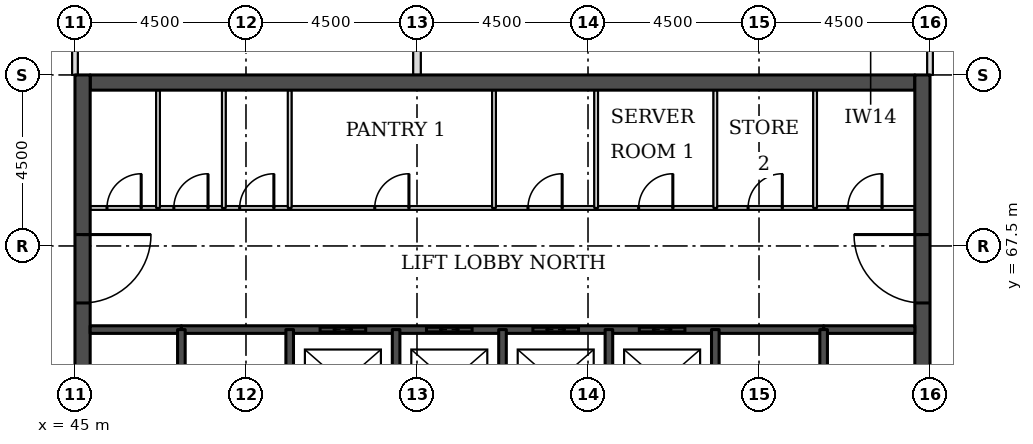
"""IFC4 building model, lengths in metres.
Left out: names, types, materials, properties, quantities, classifications, styles, units other than length and angle.
Written with IfcOpenShell. Run it as: python <this file> out.ifc"""

import sys

from ifc_helpers import new_model, si_unit, direction, frame, frame_2d, origin, place, context, subcontext, project, spatial, rectangle, extrude, element, fill, save


model = new_model("IFC4")
c1 = context("Model", 3, precision=1e-05, world=origin(), true_north=direction((0.0, 1.0)))
c2 = subcontext(c1, "Body", "Model", "MODEL_VIEW")
j1 = project(units=[si_unit("LENGTHUNIT", "METRE"), si_unit("PLANEANGLEUNIT", "RADIAN")], contexts=[c1])
p1 = place(None, origin())
s1 = spatial("IfcSite", under=j1, at=p1, CompositionType="ELEMENT")
p2 = place(p1, origin())
s2 = spatial("IfcBuilding", under=s1, at=p2, CompositionType="ELEMENT")
p3 = place(p2, frame((0.0, 0.0, 248.9)))
s3 = spatial("IfcBuildingStorey", under=s2, at=p3, CompositionType="ELEMENT", Elevation=248.9)
p4 = place(p3, frame((45.4, 71.8, 0.0), z_axis=(0.0, 0.0, 1.0), x_axis=(1.0, 0.0, 0.0)))
e1 = element("IfcWall", 1, at=p4, inside=s3, PredefinedType="SHEAR", context=c2, shape_type="SweptSolid", body=[
    extrude(rectangle(XDim=21.7, YDim=0.4, at=frame_2d((10.85, 0.0))), origin(), (0.0, 0.0, 1.0), 3.7),
])
p5 = place(p3, frame((45.2, 49.5, 0.0), z_axis=(0.0, 0.0, 1.0), x_axis=(0.0, 1.0, 0.0)))
e2 = element("IfcWall", 2, at=p5, inside=s3, PredefinedType="SHEAR", context=c2, shape_type="SweptSolid", body=[
    extrude(rectangle(XDim=22.5, YDim=0.4, at=frame_2d((11.25, 0.0))), origin(), (0.0, 0.0, 1.0), 3.7),
])
p6 = place(p5, frame((4.2, 0.0, 0.0)))
e3 = element("IfcOpeningElement", 3, at=p6, cuts=e2, PredefinedType="OPENING", context=c2, shape_type="SweptSolid", body=[
    extrude(rectangle(XDim=1.8, YDim=2.1, at=frame_2d((0.9, 1.05))), frame((0.0, 0.21, 0.0), z_axis=(0.0, -1.0, 0.0), x_axis=(1.0, 0.0, 0.0)), (0.0, 0.0, 1.0), 0.42),
])
p7 = place(p5, frame((6.9, 0.0, 0.0)))
e4 = element("IfcOpeningElement", 4, at=p7, cuts=e2, PredefinedType="OPENING", context=c2, shape_type="SweptSolid", body=[
    extrude(rectangle(XDim=1.1, YDim=2.1, at=frame_2d((0.55, 1.05))), frame((0.0, 0.21, 0.0), z_axis=(0.0, -1.0, 0.0), x_axis=(1.0, 0.0, 0.0)), (0.0, 0.0, 1.0), 0.42),
])
p8 = place(p5, frame((13.6, 0.0, 0.0)))
e5 = element("IfcOpeningElement", 5, at=p8, cuts=e2, PredefinedType="OPENING", context=c2, shape_type="SweptSolid", body=[
    extrude(rectangle(XDim=1.1, YDim=2.1, at=frame_2d((0.55, 1.05))), frame((0.0, 0.21, 0.0), z_axis=(0.0, -1.0, 0.0), x_axis=(1.0, 0.0, 0.0)), (0.0, 0.0, 1.0), 0.42),
])
p9 = place(p5, frame((16.5, 0.0, 0.0)))
e6 = element("IfcOpeningElement", 6, at=p9, cuts=e2, PredefinedType="OPENING", context=c2, shape_type="SweptSolid", body=[
    extrude(rectangle(XDim=1.8, YDim=2.1, at=frame_2d((0.9, 1.05))), frame((0.0, 0.21, 0.0), z_axis=(0.0, -1.0, 0.0), x_axis=(1.0, 0.0, 0.0)), (0.0, 0.0, 1.0), 0.42),
])
p10 = place(p3, frame((67.3, 49.5, 0.0), z_axis=(0.0, 0.0, 1.0), x_axis=(0.0, 1.0, 0.0)))
e7 = element("IfcWall", 7, at=p10, inside=s3, PredefinedType="SHEAR", context=c2, shape_type="SweptSolid", body=[
    extrude(rectangle(XDim=22.5, YDim=0.4, at=frame_2d((11.25, 0.0))), origin(), (0.0, 0.0, 1.0), 3.7),
])
p11 = place(p10, frame((4.2, 0.0, 0.0)))
e8 = element("IfcOpeningElement", 8, at=p11, cuts=e7, PredefinedType="OPENING", context=c2, shape_type="SweptSolid", body=[
    extrude(rectangle(XDim=1.8, YDim=2.1, at=frame_2d((0.9, 1.05))), frame((0.0, 0.21, 0.0), z_axis=(0.0, -1.0, 0.0), x_axis=(1.0, 0.0, 0.0)), (0.0, 0.0, 1.0), 0.42),
])
p12 = place(p10, frame((6.9, 0.0, 0.0)))
e9 = element("IfcOpeningElement", 9, at=p12, cuts=e7, PredefinedType="OPENING", context=c2, shape_type="SweptSolid", body=[
    extrude(rectangle(XDim=1.1, YDim=2.1, at=frame_2d((0.55, 1.05))), frame((0.0, 0.21, 0.0), z_axis=(0.0, -1.0, 0.0), x_axis=(1.0, 0.0, 0.0)), (0.0, 0.0, 1.0), 0.42),
])
p13 = place(p10, frame((13.6, 0.0, 0.0)))
e10 = element("IfcOpeningElement", 10, at=p13, cuts=e7, PredefinedType="OPENING", context=c2, shape_type="SweptSolid", body=[
    extrude(rectangle(XDim=1.1, YDim=2.1, at=frame_2d((0.55, 1.05))), frame((0.0, 0.21, 0.0), z_axis=(0.0, -1.0, 0.0), x_axis=(1.0, 0.0, 0.0)), (0.0, 0.0, 1.0), 0.42),
])
p14 = place(p10, frame((16.5, 0.0, 0.0)))
e11 = element("IfcOpeningElement", 11, at=p14, cuts=e7, PredefinedType="OPENING", context=c2, shape_type="SweptSolid", body=[
    extrude(rectangle(XDim=1.8, YDim=2.1, at=frame_2d((0.9, 1.05))), frame((0.0, 0.21, 0.0), z_axis=(0.0, -1.0, 0.0), x_axis=(1.0, 0.0, 0.0)), (0.0, 0.0, 1.0), 0.42),
])
p15 = place(p3, frame((45.0, 72.0, 0.0), z_axis=(0.0, 0.0, 1.0), x_axis=(0.0, 1.0, 0.0)))
e12 = element("IfcWall", 12, at=p15, inside=s3, PredefinedType="PARTITIONING", context=c2, shape_type="SweptSolid", body=[
    extrude(rectangle(XDim=3.0, YDim=0.15, at=frame_2d((1.5, 0.0))), origin(), (0.0, 0.0, 1.0), 3.022),
])
p16 = place(p3, frame((54.0, 72.0, 0.0), z_axis=(0.0, 0.0, 1.0), x_axis=(0.0, 1.0, 0.0)))
e13 = element("IfcWall", 13, at=p16, inside=s3, PredefinedType="PARTITIONING", context=c2, shape_type="SweptSolid", body=[
    extrude(rectangle(XDim=3.0, YDim=0.2, at=frame_2d((1.5, 0.0))), origin(), (0.0, 0.0, 1.0), 3.55),
])
p17 = place(p3, frame((67.5, 72.0, 0.0), z_axis=(0.0, 0.0, 1.0), x_axis=(0.0, 1.0, 0.0)))
e14 = element("IfcWall", 14, at=p17, inside=s3, PredefinedType="PARTITIONING", context=c2, shape_type="SweptSolid", body=[
    extrude(rectangle(XDim=3.0, YDim=0.15, at=frame_2d((1.5, 0.0))), origin(), (0.0, 0.0, 1.0), 3.022),
])
for number, where, z_axis, x_axis in (
    (15, (45.4, 65.3, 0.0), (0.0, 0.0, 1.0), (1.0, 0.0, 0.0)),
    (16, (64.7, 65.3, 0.0), (0.0, 0.0, 1.0), (1.0, 0.0, 0.0)),
):
    element("IfcWall", number, at=place(p3, frame(where, z_axis=z_axis, x_axis=x_axis)), inside=s3, PredefinedType="SOLIDWALL", context=c2, shape_type="SweptSolid", body=[
        extrude(rectangle(XDim=2.4, YDim=0.2, at=frame_2d((1.2, 0.0))), origin(), (0.0, 0.0, 1.0), 3.55),
    ])
p18 = place(p3, frame((47.8, 65.3, 0.0), z_axis=(0.0, 0.0, 1.0), x_axis=(1.0, 0.0, 0.0)))
e17 = element("IfcWall", 17, at=p18, inside=s3, PredefinedType="SOLIDWALL", context=c2, shape_type="SweptSolid", body=[
    extrude(rectangle(XDim=16.9, YDim=0.2, at=frame_2d((8.45, 0.0))), origin(), (0.0, 0.0, 1.0), 3.55),
])
p19 = place(p18, frame((3.65, 0.0, 0.0)))
e18 = element("IfcOpeningElement", 18, at=p19, cuts=e17, PredefinedType="OPENING", context=c2, shape_type="SweptSolid", body=[
    extrude(rectangle(XDim=1.2, YDim=2.1, at=frame_2d((0.6, 1.05))), frame((0.0, 0.11, 0.0), z_axis=(0.0, -1.0, 0.0), x_axis=(1.0, 0.0, 0.0)), (0.0, 0.0, 1.0), 0.22),
])
p20 = place(p18, frame((6.45, 0.0, 0.0)))
e19 = element("IfcOpeningElement", 19, at=p20, cuts=e17, PredefinedType="OPENING", context=c2, shape_type="SweptSolid", body=[
    extrude(rectangle(XDim=1.2, YDim=2.1, at=frame_2d((0.6, 1.05))), frame((0.0, 0.11, 0.0), z_axis=(0.0, -1.0, 0.0), x_axis=(1.0, 0.0, 0.0)), (0.0, 0.0, 1.0), 0.22),
])
p21 = place(p18, frame((9.25, 0.0, 0.0)))
e20 = element("IfcOpeningElement", 20, at=p21, cuts=e17, PredefinedType="OPENING", context=c2, shape_type="SweptSolid", body=[
    extrude(rectangle(XDim=1.2, YDim=2.1, at=frame_2d((0.6, 1.05))), frame((0.0, 0.11, 0.0), z_axis=(0.0, -1.0, 0.0), x_axis=(1.0, 0.0, 0.0)), (0.0, 0.0, 1.0), 0.22),
])
p22 = place(p18, frame((12.05, 0.0, 0.0)))
e21 = element("IfcOpeningElement", 21, at=p22, cuts=e17, PredefinedType="OPENING", context=c2, shape_type="SweptSolid", body=[
    extrude(rectangle(XDim=1.2, YDim=2.1, at=frame_2d((0.6, 1.05))), frame((0.0, 0.11, 0.0), z_axis=(0.0, -1.0, 0.0), x_axis=(1.0, 0.0, 0.0)), (0.0, 0.0, 1.0), 0.22),
])
p23 = place(p3, frame((45.4, 68.5, 0.0), z_axis=(0.0, 0.0, 1.0), x_axis=(1.0, 0.0, 0.0)))
e22 = element("IfcWall", 22, at=p23, inside=s3, PredefinedType="PARTITIONING", context=c2, shape_type="SweptSolid", body=[
    extrude(rectangle(XDim=21.7, YDim=0.1, at=frame_2d((10.85, 0.0))), origin(), (0.0, 0.0, 1.0), 3.55),
])
p24 = place(p23, frame((19.938, 0.0, 0.0)))
e23 = element("IfcOpeningElement", 23, at=p24, cuts=e22, PredefinedType="OPENING", context=c2, shape_type="SweptSolid", body=[
    extrude(rectangle(XDim=0.9, YDim=2.1, at=frame_2d((0.45, 1.05))), frame((0.0, 0.06, 0.0), z_axis=(0.0, -1.0, 0.0), x_axis=(1.0, 0.0, 0.0)), (0.0, 0.0, 1.0), 0.12),
])
p25 = place(p23, frame((17.312, 0.0, 0.0)))
e24 = element("IfcOpeningElement", 24, at=p25, cuts=e22, PredefinedType="OPENING", context=c2, shape_type="SweptSolid", body=[
    extrude(rectangle(XDim=0.9, YDim=2.1, at=frame_2d((0.45, 1.05))), frame((0.0, 0.06, 0.0), z_axis=(0.0, -1.0, 0.0), x_axis=(1.0, 0.0, 0.0)), (0.0, 0.0, 1.0), 0.12),
])
p26 = place(p23, frame((0.442, 0.0, 0.0)))
e25 = element("IfcOpeningElement", 25, at=p26, cuts=e22, PredefinedType="OPENING", context=c2, shape_type="SweptSolid", body=[
    extrude(rectangle(XDim=0.9, YDim=2.1, at=frame_2d((0.45, 1.05))), frame((0.0, 0.06, 0.0), z_axis=(0.0, -1.0, 0.0), x_axis=(1.0, 0.0, 0.0)), (0.0, 0.0, 1.0), 0.12),
])
p27 = place(p23, frame((2.201, 0.0, 0.0)))
e26 = element("IfcOpeningElement", 26, at=p27, cuts=e22, PredefinedType="OPENING", context=c2, shape_type="SweptSolid", body=[
    extrude(rectangle(XDim=0.9, YDim=2.1, at=frame_2d((0.45, 1.05))), frame((0.0, 0.06, 0.0), z_axis=(0.0, -1.0, 0.0), x_axis=(1.0, 0.0, 0.0)), (0.0, 0.0, 1.0), 0.12),
])
p28 = place(p23, frame((3.934, 0.0, 0.0)))
e27 = element("IfcOpeningElement", 27, at=p28, cuts=e22, PredefinedType="OPENING", context=c2, shape_type="SweptSolid", body=[
    extrude(rectangle(XDim=0.9, YDim=2.1, at=frame_2d((0.45, 1.05))), frame((0.0, 0.06, 0.0), z_axis=(0.0, -1.0, 0.0), x_axis=(1.0, 0.0, 0.0)), (0.0, 0.0, 1.0), 0.12),
])
p29 = place(p23, frame((14.432, 0.0, 0.0)))
e28 = element("IfcOpeningElement", 28, at=p29, cuts=e22, PredefinedType="OPENING", context=c2, shape_type="SweptSolid", body=[
    extrude(rectangle(XDim=0.9, YDim=2.1, at=frame_2d((0.45, 1.05))), frame((0.0, 0.06, 0.0), z_axis=(0.0, -1.0, 0.0), x_axis=(1.0, 0.0, 0.0)), (0.0, 0.0, 1.0), 0.12),
])
p30 = place(p23, frame((11.52, 0.0, 0.0)))
e29 = element("IfcOpeningElement", 29, at=p30, cuts=e22, PredefinedType="OPENING", context=c2, shape_type="SweptSolid", body=[
    extrude(rectangle(XDim=0.9, YDim=2.1, at=frame_2d((0.45, 1.05))), frame((0.0, 0.06, 0.0), z_axis=(0.0, -1.0, 0.0), x_axis=(1.0, 0.0, 0.0)), (0.0, 0.0, 1.0), 0.12),
])
p31 = place(p23, frame((7.488, 0.0, 0.0)))
e30 = element("IfcOpeningElement", 30, at=p31, cuts=e22, PredefinedType="OPENING", context=c2, shape_type="SweptSolid", body=[
    extrude(rectangle(XDim=0.9, YDim=2.1, at=frame_2d((0.45, 1.05))), frame((0.0, 0.06, 0.0), z_axis=(0.0, -1.0, 0.0), x_axis=(1.0, 0.0, 0.0)), (0.0, 0.0, 1.0), 0.12),
])
p32 = place(p3, frame((47.185, 68.5, 0.0), z_axis=(0.0, 0.0, 1.0), x_axis=(0.0, 1.0, 0.0)))
e31 = element("IfcWall", 31, at=p32, inside=s3, PredefinedType="PARTITIONING", context=c2, shape_type="SweptSolid", body=[
    extrude(rectangle(XDim=3.1, YDim=0.1, at=frame_2d((1.55, 0.0))), origin(), (0.0, 0.0, 1.0), 3.55),
])
p33 = place(p3, frame((47.8, 62.0, 0.0), z_axis=(0.0, 0.0, 1.0), x_axis=(0.0, 1.0, 0.0)))
e32 = element("IfcWall", 32, at=p33, inside=s3, PredefinedType="SOLIDWALL", context=c2, shape_type="SweptSolid", body=[
    extrude(rectangle(XDim=3.3, YDim=0.2, at=frame_2d((1.65, 0.0))), origin(), (0.0, 0.0, 1.0), 3.55),
])
p34 = place(p33, frame((1.1, 0.0, 0.0)))
e33 = element("IfcOpeningElement", 33, at=p34, cuts=e32, PredefinedType="OPENING", context=c2, shape_type="SweptSolid", body=[
    extrude(rectangle(XDim=1.1, YDim=2.1, at=frame_2d((0.55, 1.05))), frame((0.0, 0.11, 0.0), z_axis=(0.0, -1.0, 0.0), x_axis=(1.0, 0.0, 0.0)), (0.0, 0.0, 1.0), 0.22),
])
for number, where, z_axis, x_axis in (
    (34, (48.917, 68.5, 0.0), (0.0, 0.0, 1.0), (0.0, 1.0, 0.0)),
    (35, (50.65, 68.5, 0.0), (0.0, 0.0, 1.0), (0.0, 1.0, 0.0)),
):
    element("IfcWall", number, at=place(p3, frame(where, z_axis=z_axis, x_axis=x_axis)), inside=s3, PredefinedType="PARTITIONING", context=c2, shape_type="SweptSolid", body=[
        extrude(rectangle(XDim=3.1, YDim=0.1, at=frame_2d((1.55, 0.0))), origin(), (0.0, 0.0, 1.0), 3.55),
    ])
p35 = place(p3, frame((50.65, 62.0, 0.0), z_axis=(0.0, 0.0, 1.0), x_axis=(0.0, 1.0, 0.0)))
e36 = element("IfcWall", 36, at=p35, inside=s3, PredefinedType="SOLIDWALL", context=c2, shape_type="SweptSolid", body=[
    extrude(rectangle(XDim=3.3, YDim=0.2, at=frame_2d((1.65, 0.0))), origin(), (0.0, 0.0, 1.0), 3.55),
])
p36 = place(p3, frame((53.45, 62.5, 0.0), z_axis=(0.0, 0.0, 1.0), x_axis=(0.0, 1.0, 0.0)))
e37 = element("IfcWall", 37, at=p36, inside=s3, PredefinedType="SOLIDWALL", context=c2, shape_type="SweptSolid", body=[
    extrude(rectangle(XDim=2.8, YDim=0.2, at=frame_2d((1.4, 0.0))), origin(), (0.0, 0.0, 1.0), 3.55),
])
p37 = place(p3, frame((56.026, 68.5, 0.0), z_axis=(0.0, 0.0, 1.0), x_axis=(0.0, 1.0, 0.0)))
e38 = element("IfcWall", 38, at=p37, inside=s3, PredefinedType="PARTITIONING", context=c2, shape_type="SweptSolid", body=[
    extrude(rectangle(XDim=3.1, YDim=0.1, at=frame_2d((1.55, 0.0))), origin(), (0.0, 0.0, 1.0), 3.55),
])
p38 = place(p3, frame((56.25, 62.5, 0.0), z_axis=(0.0, 0.0, 1.0), x_axis=(0.0, 1.0, 0.0)))
e39 = element("IfcWall", 39, at=p38, inside=s3, PredefinedType="SOLIDWALL", context=c2, shape_type="SweptSolid", body=[
    extrude(rectangle(XDim=2.8, YDim=0.2, at=frame_2d((1.4, 0.0))), origin(), (0.0, 0.0, 1.0), 3.55),
])
p39 = place(p3, frame((58.714, 68.5, 0.0), z_axis=(0.0, 0.0, 1.0), x_axis=(0.0, 1.0, 0.0)))
e40 = element("IfcWall", 40, at=p39, inside=s3, PredefinedType="PARTITIONING", context=c2, shape_type="SweptSolid", body=[
    extrude(rectangle(XDim=3.1, YDim=0.1, at=frame_2d((1.55, 0.0))), origin(), (0.0, 0.0, 1.0), 3.55),
])
p40 = place(p3, frame((59.05, 62.5, 0.0), z_axis=(0.0, 0.0, 1.0), x_axis=(0.0, 1.0, 0.0)))
e41 = element("IfcWall", 41, at=p40, inside=s3, PredefinedType="SOLIDWALL", context=c2, shape_type="SweptSolid", body=[
    extrude(rectangle(XDim=2.8, YDim=0.2, at=frame_2d((1.4, 0.0))), origin(), (0.0, 0.0, 1.0), 3.55),
])
p41 = place(p3, frame((61.85, 68.5, 0.0), z_axis=(0.0, 0.0, 1.0), x_axis=(0.0, 1.0, 0.0)))
e42 = element("IfcWall", 42, at=p41, inside=s3, PredefinedType="PARTITIONING", context=c2, shape_type="SweptSolid", body=[
    extrude(rectangle(XDim=3.1, YDim=0.1, at=frame_2d((1.55, 0.0))), origin(), (0.0, 0.0, 1.0), 3.55),
])
p42 = place(p3, frame((61.85, 62.0, 0.0), z_axis=(0.0, 0.0, 1.0), x_axis=(0.0, 1.0, 0.0)))
e43 = element("IfcWall", 43, at=p42, inside=s3, PredefinedType="SOLIDWALL", context=c2, shape_type="SweptSolid", body=[
    extrude(rectangle(XDim=3.3, YDim=0.2, at=frame_2d((1.65, 0.0))), origin(), (0.0, 0.0, 1.0), 3.55),
])
p43 = place(p3, frame((64.475, 68.5, 0.0), z_axis=(0.0, 0.0, 1.0), x_axis=(0.0, 1.0, 0.0)))
e44 = element("IfcWall", 44, at=p43, inside=s3, PredefinedType="PARTITIONING", context=c2, shape_type="SweptSolid", body=[
    extrude(rectangle(XDim=3.1, YDim=0.1, at=frame_2d((1.55, 0.0))), origin(), (0.0, 0.0, 1.0), 3.55),
])
p44 = place(p3, frame((64.7, 62.0, 0.0), z_axis=(0.0, 0.0, 1.0), x_axis=(0.0, 1.0, 0.0)))
e45 = element("IfcWall", 45, at=p44, inside=s3, PredefinedType="SOLIDWALL", context=c2, shape_type="SweptSolid", body=[
    extrude(rectangle(XDim=3.3, YDim=0.2, at=frame_2d((1.65, 0.0))), origin(), (0.0, 0.0, 1.0), 3.55),
])
p45 = place(p44, frame((1.1, 0.0, 0.0)))
e46 = element("IfcOpeningElement", 46, at=p45, cuts=e45, PredefinedType="OPENING", context=c2, shape_type="SweptSolid", body=[
    extrude(rectangle(XDim=1.1, YDim=2.1, at=frame_2d((0.55, 1.05))), frame((0.0, 0.11, 0.0), z_axis=(0.0, -1.0, 0.0), x_axis=(1.0, 0.0, 0.0)), (0.0, 0.0, 1.0), 0.22),
])
p46 = place(p19, origin())
e47 = element("IfcDoor", 47, at=p46, inside=s3, OperationType="DOUBLE_DOOR_SLIDING", PredefinedType="DOOR", context=c2, shape_type="SweptSolid", body=[
    extrude(rectangle(XDim=1.2, YDim=2.1, at=frame_2d((0.6, 1.05))), frame((0.0, 0.025, 0.0), z_axis=(0.0, -1.0, 0.0), x_axis=(1.0, 0.0, 0.0)), (0.0, 0.0, 1.0), 0.05),
])
fill(e18, e47)
p47 = place(p20, origin())
e48 = element("IfcDoor", 48, at=p47, inside=s3, OperationType="DOUBLE_DOOR_SLIDING", PredefinedType="DOOR", context=c2, shape_type="SweptSolid", body=[
    extrude(rectangle(XDim=1.2, YDim=2.1, at=frame_2d((0.6, 1.05))), frame((0.0, 0.025, 0.0), z_axis=(0.0, -1.0, 0.0), x_axis=(1.0, 0.0, 0.0)), (0.0, 0.0, 1.0), 0.05),
])
fill(e19, e48)
p48 = place(p21, origin())
e49 = element("IfcDoor", 49, at=p48, inside=s3, OperationType="DOUBLE_DOOR_SLIDING", PredefinedType="DOOR", context=c2, shape_type="SweptSolid", body=[
    extrude(rectangle(XDim=1.2, YDim=2.1, at=frame_2d((0.6, 1.05))), frame((0.0, 0.025, 0.0), z_axis=(0.0, -1.0, 0.0), x_axis=(1.0, 0.0, 0.0)), (0.0, 0.0, 1.0), 0.05),
])
fill(e20, e49)
p49 = place(p22, origin())
e50 = element("IfcDoor", 50, at=p49, inside=s3, OperationType="DOUBLE_DOOR_SLIDING", PredefinedType="DOOR", context=c2, shape_type="SweptSolid", body=[
    extrude(rectangle(XDim=1.2, YDim=2.1, at=frame_2d((0.6, 1.05))), frame((0.0, 0.025, 0.0), z_axis=(0.0, -1.0, 0.0), x_axis=(1.0, 0.0, 0.0)), (0.0, 0.0, 1.0), 0.05),
])
fill(e21, e50)
p50 = place(p9, frame((1.8, 0.0, 0.0), z_axis=(0.0, 0.0, 1.0), x_axis=(-1.0, 0.0, 0.0)))
e51 = element("IfcDoor", 51, at=p50, inside=s3, OperationType="SINGLE_SWING_LEFT", PredefinedType="DOOR", context=c2, shape_type="SweptSolid", body=[
    extrude(rectangle(XDim=1.8, YDim=2.1, at=frame_2d((0.9, 1.05))), frame((0.0, 0.025, 0.0), z_axis=(0.0, -1.0, 0.0), x_axis=(1.0, 0.0, 0.0)), (0.0, 0.0, 1.0), 0.05),
])
fill(e6, e51)
p51 = place(p14, origin())
e52 = element("IfcDoor", 52, at=p51, inside=s3, OperationType="SINGLE_SWING_RIGHT", PredefinedType="DOOR", context=c2, shape_type="SweptSolid", body=[
    extrude(rectangle(XDim=1.8, YDim=2.1, at=frame_2d((0.9, 1.05))), frame((0.0, 0.025, 0.0), z_axis=(0.0, -1.0, 0.0), x_axis=(1.0, 0.0, 0.0)), (0.0, 0.0, 1.0), 0.05),
])
fill(e11, e52)
p52 = place(p24, origin())
e53 = element("IfcDoor", 53, at=p52, inside=s3, OperationType="SINGLE_SWING_RIGHT", PredefinedType="DOOR", context=c2, shape_type="SweptSolid", body=[
    extrude(rectangle(XDim=0.9, YDim=2.1, at=frame_2d((0.45, 1.05))), frame((0.0, 0.025, 0.0), z_axis=(0.0, -1.0, 0.0), x_axis=(1.0, 0.0, 0.0)), (0.0, 0.0, 1.0), 0.05),
])
fill(e23, e53)
p53 = place(p25, origin())
e54 = element("IfcDoor", 54, at=p53, inside=s3, OperationType="SINGLE_SWING_RIGHT", PredefinedType="DOOR", context=c2, shape_type="SweptSolid", body=[
    extrude(rectangle(XDim=0.9, YDim=2.1, at=frame_2d((0.45, 1.05))), frame((0.0, 0.025, 0.0), z_axis=(0.0, -1.0, 0.0), x_axis=(1.0, 0.0, 0.0)), (0.0, 0.0, 1.0), 0.05),
])
fill(e24, e54)
p54 = place(p26, origin())
e55 = element("IfcDoor", 55, at=p54, inside=s3, OperationType="SINGLE_SWING_RIGHT", PredefinedType="DOOR", context=c2, shape_type="SweptSolid", body=[
    extrude(rectangle(XDim=0.9, YDim=2.1, at=frame_2d((0.45, 1.05))), frame((0.0, 0.025, 0.0), z_axis=(0.0, -1.0, 0.0), x_axis=(1.0, 0.0, 0.0)), (0.0, 0.0, 1.0), 0.05),
])
fill(e25, e55)
p55 = place(p27, origin())
e56 = element("IfcDoor", 56, at=p55, inside=s3, OperationType="SINGLE_SWING_RIGHT", PredefinedType="DOOR", context=c2, shape_type="SweptSolid", body=[
    extrude(rectangle(XDim=0.9, YDim=2.1, at=frame_2d((0.45, 1.05))), frame((0.0, 0.025, 0.0), z_axis=(0.0, -1.0, 0.0), x_axis=(1.0, 0.0, 0.0)), (0.0, 0.0, 1.0), 0.05),
])
fill(e26, e56)
p56 = place(p28, origin())
e57 = element("IfcDoor", 57, at=p56, inside=s3, OperationType="SINGLE_SWING_RIGHT", PredefinedType="DOOR", context=c2, shape_type="SweptSolid", body=[
    extrude(rectangle(XDim=0.9, YDim=2.1, at=frame_2d((0.45, 1.05))), frame((0.0, 0.025, 0.0), z_axis=(0.0, -1.0, 0.0), x_axis=(1.0, 0.0, 0.0)), (0.0, 0.0, 1.0), 0.05),
])
fill(e27, e57)
p57 = place(p29, origin())
e58 = element("IfcDoor", 58, at=p57, inside=s3, OperationType="SINGLE_SWING_RIGHT", PredefinedType="DOOR", context=c2, shape_type="SweptSolid", body=[
    extrude(rectangle(XDim=0.9, YDim=2.1, at=frame_2d((0.45, 1.05))), frame((0.0, 0.025, 0.0), z_axis=(0.0, -1.0, 0.0), x_axis=(1.0, 0.0, 0.0)), (0.0, 0.0, 1.0), 0.05),
])
fill(e28, e58)
p58 = place(p30, origin())
e59 = element("IfcDoor", 59, at=p58, inside=s3, OperationType="SINGLE_SWING_RIGHT", PredefinedType="DOOR", context=c2, shape_type="SweptSolid", body=[
    extrude(rectangle(XDim=0.9, YDim=2.1, at=frame_2d((0.45, 1.05))), frame((0.0, 0.025, 0.0), z_axis=(0.0, -1.0, 0.0), x_axis=(1.0, 0.0, 0.0)), (0.0, 0.0, 1.0), 0.05),
])
fill(e29, e59)
p59 = place(p31, origin())
e60 = element("IfcDoor", 60, at=p59, inside=s3, OperationType="SINGLE_SWING_RIGHT", PredefinedType="DOOR", context=c2, shape_type="SweptSolid", body=[
    extrude(rectangle(XDim=0.9, YDim=2.1, at=frame_2d((0.45, 1.05))), frame((0.0, 0.025, 0.0), z_axis=(0.0, -1.0, 0.0), x_axis=(1.0, 0.0, 0.0)), (0.0, 0.0, 1.0), 0.05),
])
fill(e30, e60)
save(model, sys.argv[1])
